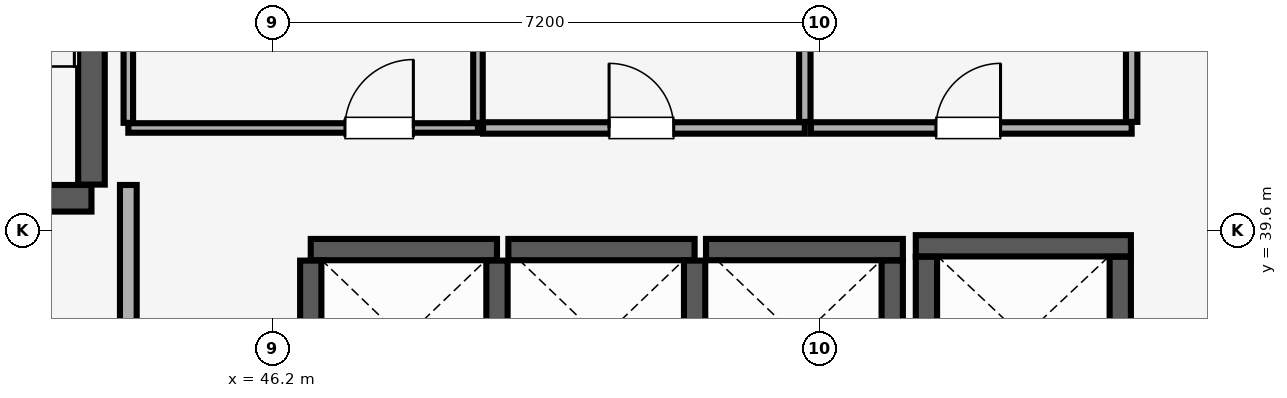
"""IFC4 building model, lengths in metres.
Left out: names, types, materials, properties, quantities, classifications, styles, units other than length and angle.
Written with IfcOpenShell. Run it as: python <this file> out.ifc"""

import sys

from ifc_helpers import new_model, si_unit, direction, frame, frame_2d, origin, place, context, subcontext, project, spatial, rectangle, extrude, element, fill, save


model = new_model("IFC4")
c1 = context("Model", 3, precision=1e-05, world=origin(), true_north=direction((0.0, 1.0)))
c2 = subcontext(c1, "Body", "Model", "MODEL_VIEW")
j1 = project(units=[si_unit("LENGTHUNIT", "METRE"), si_unit("PLANEANGLEUNIT", "RADIAN")], contexts=[c1])
p1 = place(None, origin())
s1 = spatial("IfcSite", under=j1, at=p1, CompositionType="ELEMENT")
p2 = place(p1, origin())
s2 = spatial("IfcBuilding", under=s1, at=p2, CompositionType="ELEMENT")
p3 = place(p2, frame((0.0, 0.0, 72.65)))
s3 = spatial("IfcBuildingStorey", under=s2, at=p3, CompositionType="ELEMENT", Elevation=72.65)
p4 = place(p3, frame((40.185, 40.025, 0.0), z_axis=(0.0, 0.0, 1.0), x_axis=(1.0, 0.0, 0.0)))
e1 = element("IfcWall", 1, at=p4, inside=s3, PredefinedType="SHEAR", context=c2, shape_type="SweptSolid", body=[
    extrude(rectangle(XDim=3.63, YDim=0.35, at=frame_2d((1.815, 0.0))), origin(), (0.0, 0.0, 1.0), 3.51),
])
p5 = place(p4, frame((1.24, 0.0, 0.0)))
e2 = element("IfcOpeningElement", 2, at=p5, cuts=e1, PredefinedType="OPENING", context=c2, shape_type="SweptSolid", body=[
    extrude(rectangle(XDim=1.15, YDim=2.15, at=frame_2d((0.575, 1.075))), frame((0.0, 0.185, 0.0), z_axis=(0.0, -1.0, 0.0), x_axis=(1.0, 0.0, 0.0)), (0.0, 0.0, 1.0), 0.37),
])
p6 = place(p3, frame((43.815, 40.205, 0.0), z_axis=(0.0, 0.0, 1.0), x_axis=(0.0, 1.0, 0.0)))
e3 = element("IfcWall", 3, at=p6, inside=s3, PredefinedType="SHEAR", context=c2, shape_type="SweptSolid", body=[
    extrude(rectangle(XDim=8.09, YDim=0.35, at=frame_2d((4.045, 0.0))), origin(), (0.0, 0.0, 1.0), 3.51),
])
p7 = place(p3, frame((46.7, 39.35, 0.0), z_axis=(0.0, 0.0, 1.0), x_axis=(1.0, 0.0, 0.0)))
e4 = element("IfcWall", 4, at=p7, inside=s3, PredefinedType="SHEAR", context=c2, shape_type="SweptSolid", body=[
    extrude(rectangle(XDim=2.45, YDim=0.28, at=frame_2d((1.225, 0.0))), origin(), (0.0, 0.0, 1.0), 3.51),
])
for number, where, z_axis, x_axis in (
    (5, (46.7, 37.145, 0.0), (0.0, 0.0, 1.0), (0.0, 1.0, 0.0)),
    (6, (49.15, 37.145, 0.0), (0.0, 0.0, 1.0), (0.0, 1.0, 0.0)),
):
    element("IfcWall", number, at=place(p3, frame(where, z_axis=z_axis, x_axis=x_axis)), inside=s3, PredefinedType="SHEAR", context=c2, shape_type="SweptSolid", body=[
        extrude(rectangle(XDim=2.06, YDim=0.28, at=frame_2d((1.03, 0.0))), origin(), (0.0, 0.0, 1.0), 3.51),
    ])
p8 = place(p3, frame((49.3, 39.35, 0.0), z_axis=(0.0, 0.0, 1.0), x_axis=(1.0, 0.0, 0.0)))
e7 = element("IfcWall", 7, at=p8, inside=s3, PredefinedType="SHEAR", context=c2, shape_type="SweptSolid", body=[
    extrude(rectangle(XDim=2.45, YDim=0.28, at=frame_2d((1.225, 0.0))), origin(), (0.0, 0.0, 1.0), 3.51),
])
p9 = place(p3, frame((51.75, 37.145, 0.0), z_axis=(0.0, 0.0, 1.0), x_axis=(0.0, 1.0, 0.0)))
e8 = element("IfcWall", 8, at=p9, inside=s3, PredefinedType="SHEAR", context=c2, shape_type="SweptSolid", body=[
    extrude(rectangle(XDim=2.06, YDim=0.28, at=frame_2d((1.03, 0.0))), origin(), (0.0, 0.0, 1.0), 3.51),
])
p10 = place(p3, frame((51.9, 39.35, 0.0), z_axis=(0.0, 0.0, 1.0), x_axis=(1.0, 0.0, 0.0)))
e9 = element("IfcWall", 9, at=p10, inside=s3, PredefinedType="SHEAR", context=c2, shape_type="SweptSolid", body=[
    extrude(rectangle(XDim=2.59, YDim=0.28, at=frame_2d((1.295, 0.0))), origin(), (0.0, 0.0, 1.0), 3.51),
])
p11 = place(p3, frame((54.35, 37.145, 0.0), z_axis=(0.0, 0.0, 1.0), x_axis=(0.0, 1.0, 0.0)))
e10 = element("IfcWall", 10, at=p11, inside=s3, PredefinedType="SHEAR", context=c2, shape_type="SweptSolid", body=[
    extrude(rectangle(XDim=2.06, YDim=0.28, at=frame_2d((1.03, 0.0))), origin(), (0.0, 0.0, 1.0), 3.51),
])
p12 = place(p3, frame((54.66, 39.4, 0.0), z_axis=(0.0, 0.0, 1.0), x_axis=(1.0, 0.0, 0.0)))
e11 = element("IfcWall", 11, at=p12, inside=s3, PredefinedType="SHEAR", context=c2, shape_type="SweptSolid", body=[
    extrude(rectangle(XDim=2.83, YDim=0.28, at=frame_2d((1.415, 0.0))), origin(), (0.0, 0.0, 1.0), 3.51),
])
for number, where, z_axis, x_axis in (
    (12, (54.8, 37.145, 0.0), (0.0, 0.0, 1.0), (0.0, 1.0, 0.0)),
    (13, (57.35, 37.145, 0.0), (0.0, 0.0, 1.0), (0.0, 1.0, 0.0)),
):
    element("IfcWall", number, at=place(p3, frame(where, z_axis=z_axis, x_axis=x_axis)), inside=s3, PredefinedType="SHEAR", context=c2, shape_type="SweptSolid", body=[
        extrude(rectangle(XDim=2.11, YDim=0.28, at=frame_2d((1.055, 0.0))), origin(), (0.0, 0.0, 1.0), 3.51),
    ])
p13 = place(p3, frame((44.3, 34.415, 0.0), z_axis=(0.0, 0.0, 1.0), x_axis=(0.0, 1.0, 0.0)))
e14 = element("IfcWall", 14, at=p13, inside=s3, PredefinedType="PARTITIONING", context=c2, shape_type="SweptSolid", body=[
    extrude(rectangle(XDim=5.785, YDim=0.22, at=frame_2d((2.893, 0.0))), origin(), (0.0, 0.0, 1.0), 3.51),
])
p14 = place(p3, frame((44.3, 40.95, 0.0), z_axis=(0.0, 0.0, 1.0), x_axis=(1.0, 0.0, 0.0)))
e15 = element("IfcWall", 15, at=p14, inside=s3, PredefinedType="PARTITIONING", context=c2, shape_type="SweptSolid", body=[
    extrude(rectangle(XDim=4.6, YDim=0.125, at=frame_2d((2.3, 0.0))), origin(), (0.0, 0.0, 1.0), 3.51),
])
p15 = place(p14, frame((2.85, 0.0, 0.0)))
e16 = element("IfcOpeningElement", 16, at=p15, cuts=e15, PredefinedType="OPENING", context=c2, shape_type="SweptSolid", body=[
    extrude(rectangle(XDim=0.9, YDim=2.1, at=frame_2d((0.45, 1.05))), frame((0.0, 0.073, 0.0), z_axis=(0.0, -1.0, 0.0), x_axis=(1.0, 0.0, 0.0)), (0.0, 0.0, 1.0), 0.145),
])
for number, where, z_axis, x_axis in (
    (17, (44.3, 41.018, 0.0), (0.0, 0.0, 1.0), (0.0, 1.0, 0.0)),
    (18, (48.9, 41.018, 0.0), (0.0, 0.0, 1.0), (0.0, 1.0, 0.0)),
):
    element("IfcWall", number, at=place(p3, frame(where, z_axis=z_axis, x_axis=x_axis)), inside=s3, PredefinedType="PARTITIONING", context=c2, shape_type="SweptSolid", body=[
        extrude(rectangle(XDim=3.515, YDim=0.125, at=frame_2d((1.757, 0.0))), origin(), (0.0, 0.0, 1.0), 3.51),
    ])
p16 = place(p3, frame((48.968, 40.95, 0.0), z_axis=(0.0, 0.0, 1.0), x_axis=(1.0, 0.0, 0.0)))
e19 = element("IfcWall", 19, at=p16, inside=s3, PredefinedType="PARTITIONING", context=c2, shape_type="SweptSolid", body=[
    extrude(rectangle(XDim=4.232, YDim=0.15, at=frame_2d((2.116, 0.0))), origin(), (0.0, 0.0, 1.0), 3.51),
])
p17 = place(p16, frame((1.657, 0.0, 0.0)))
e20 = element("IfcOpeningElement", 20, at=p17, cuts=e19, PredefinedType="OPENING", context=c2, shape_type="SweptSolid", body=[
    extrude(rectangle(XDim=0.85, YDim=2.1, at=frame_2d((0.425, 1.05))), frame((0.0, 0.085, 0.0), z_axis=(0.0, -1.0, 0.0), x_axis=(1.0, 0.0, 0.0)), (0.0, 0.0, 1.0), 0.17),
])
p18 = place(p3, frame((53.2, 41.03, 0.0), z_axis=(0.0, 0.0, 1.0), x_axis=(0.0, 1.0, 0.0)))
e21 = element("IfcWall", 21, at=p18, inside=s3, PredefinedType="PARTITIONING", context=c2, shape_type="SweptSolid", body=[
    extrude(rectangle(XDim=7.82, YDim=0.15, at=frame_2d((3.91, 0.0))), origin(), (0.0, 0.0, 1.0), 3.51),
])
p19 = place(p3, frame((53.28, 40.95, 0.0), z_axis=(0.0, 0.0, 1.0), x_axis=(1.0, 0.0, 0.0)))
e22 = element("IfcWall", 22, at=p19, inside=s3, PredefinedType="PARTITIONING", context=c2, shape_type="SweptSolid", body=[
    extrude(rectangle(XDim=4.22, YDim=0.15, at=frame_2d((2.11, 0.0))), origin(), (0.0, 0.0, 1.0), 3.51),
])
p20 = place(p19, frame((1.645, 0.0, 0.0)))
e23 = element("IfcOpeningElement", 23, at=p20, cuts=e22, PredefinedType="OPENING", context=c2, shape_type="SweptSolid", body=[
    extrude(rectangle(XDim=0.85, YDim=2.1, at=frame_2d((0.425, 1.05))), frame((0.0, 0.085, 0.0), z_axis=(0.0, -1.0, 0.0), x_axis=(1.0, 0.0, 0.0)), (0.0, 0.0, 1.0), 0.17),
])
p21 = place(p3, frame((57.5, 41.03, 0.0), z_axis=(0.0, 0.0, 1.0), x_axis=(0.0, 1.0, 0.0)))
e24 = element("IfcWall", 24, at=p21, inside=s3, PredefinedType="PARTITIONING", context=c2, shape_type="SweptSolid", body=[
    extrude(rectangle(XDim=2.155, YDim=0.15, at=frame_2d((1.078, 0.0))), origin(), (0.0, 0.0, 1.0), 3.51),
])
p22 = place(p15, origin())
e25 = element("IfcDoor", 25, at=p22, inside=s3, OperationType="SINGLE_SWING_RIGHT", PredefinedType="DOOR", context=c2, shape_type="SweptSolid", body=[
    extrude(rectangle(XDim=0.9, YDim=2.1, at=frame_2d((0.45, 1.05))), frame((0.0, 0.025, 0.0), z_axis=(0.0, -1.0, 0.0), x_axis=(1.0, 0.0, 0.0)), (0.0, 0.0, 1.0), 0.05),
])
fill(e16, e25)
p23 = place(p17, origin())
e26 = element("IfcDoor", 26, at=p23, inside=s3, OperationType="SINGLE_SWING_LEFT", PredefinedType="DOOR", context=c2, shape_type="SweptSolid", body=[
    extrude(rectangle(XDim=0.85, YDim=2.1, at=frame_2d((0.425, 1.05))), frame((0.0, 0.025, 0.0), z_axis=(0.0, -1.0, 0.0), x_axis=(1.0, 0.0, 0.0)), (0.0, 0.0, 1.0), 0.05),
])
fill(e20, e26)
p24 = place(p20, origin())
e27 = element("IfcDoor", 27, at=p24, inside=s3, OperationType="SINGLE_SWING_RIGHT", PredefinedType="DOOR", context=c2, shape_type="SweptSolid", body=[
    extrude(rectangle(XDim=0.85, YDim=2.1, at=frame_2d((0.425, 1.05))), frame((0.0, 0.025, 0.0), z_axis=(0.0, -1.0, 0.0), x_axis=(1.0, 0.0, 0.0)), (0.0, 0.0, 1.0), 0.05),
])
fill(e23, e27)
save(model, sys.argv[1])
